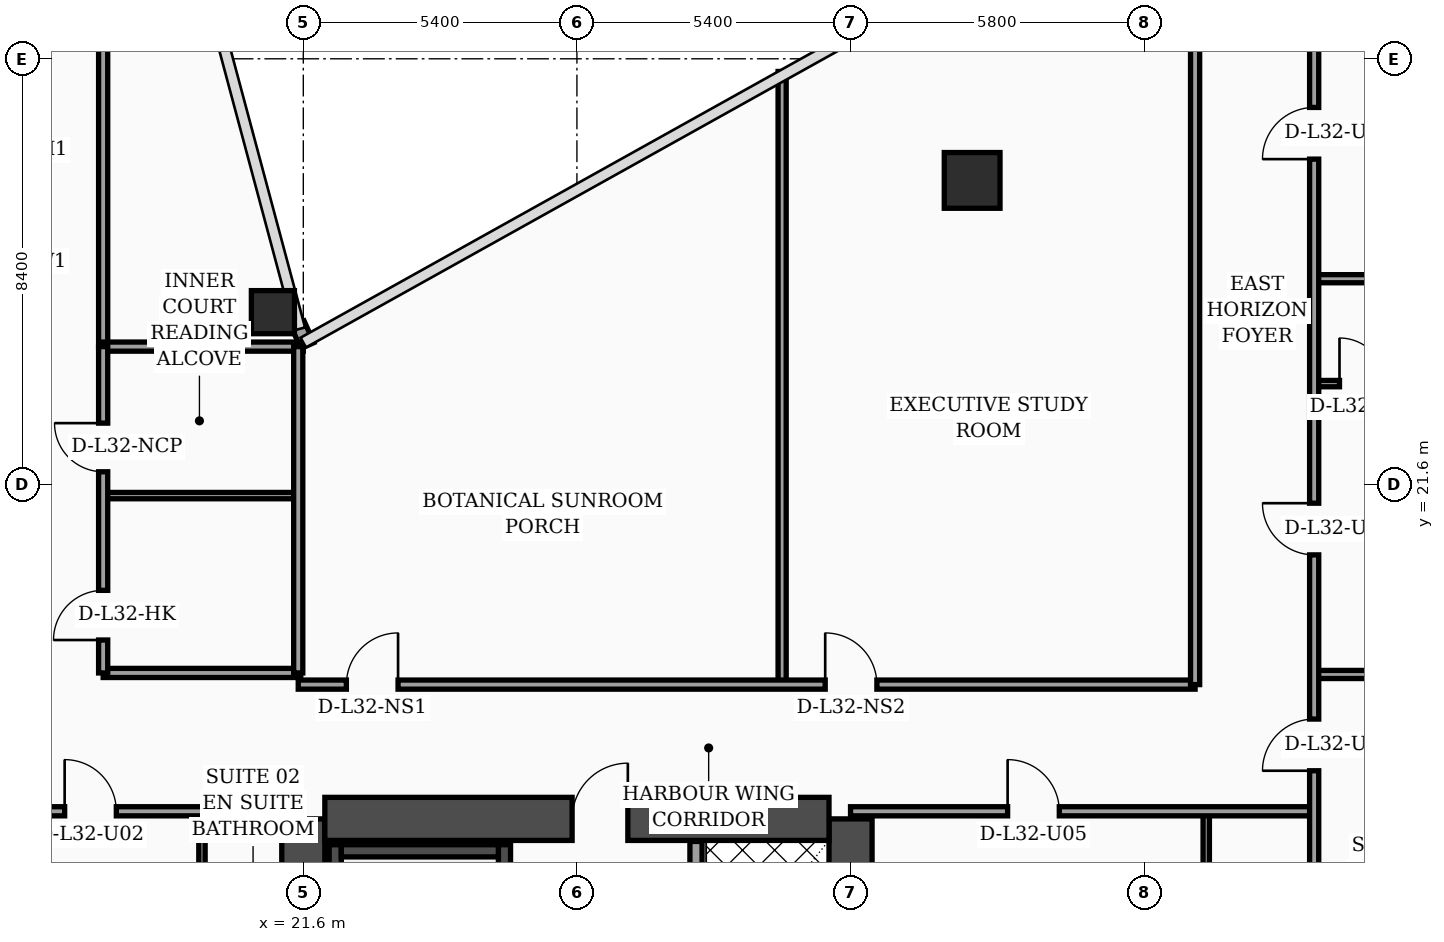
"""IFC4 building model, lengths in metres.
Left out: names, types, materials, properties, quantities, classifications, styles, units other than length and angle.
Written with IfcOpenShell. Run it as: python <this file> out.ifc"""

import sys

from ifc_helpers import new_model, si_unit, direction, frame, frame_2d, origin, origin_2d, place, context, subcontext, project, spatial, rectangle, hollow_rectangle, circle, extrude, element, fill, save


model = new_model("IFC4")
c1 = context("Model", 3, precision=1e-05, world=origin(), true_north=direction((0.0, 1.0)))
c2 = subcontext(c1, "Body", "Model", "MODEL_VIEW")
j1 = project(units=[si_unit("LENGTHUNIT", "METRE"), si_unit("PLANEANGLEUNIT", "RADIAN")], contexts=[c1])
p1 = place(None, origin())
s1 = spatial("IfcSite", under=j1, at=p1, CompositionType="ELEMENT")
p2 = place(p1, origin())
s2 = spatial("IfcBuilding", under=s1, at=p2, CompositionType="ELEMENT")
p3 = place(p2, frame((0.0, 0.0, 131.6)))
s3 = spatial("IfcBuildingStorey", under=s2, at=p3, CompositionType="ELEMENT", Elevation=131.6)
for number, where, z_axis, x_axis in (
    (1, (21.6, 4.6, 0.0), (0.0, 0.0, 1.0), (0.0, 1.0, 0.0)),
    (2, (32.4, 4.6, 0.0), (0.0, 0.0, 1.0), (0.0, 1.0, 0.0)),
):
    element("IfcWall", number, at=place(p3, frame(where, z_axis=z_axis, x_axis=x_axis)), inside=s3, PredefinedType="SHEAR", context=c2, shape_type="SweptSolid", body=[
        extrude(rectangle(XDim=10.4, YDim=0.85, at=frame_2d((5.2, 0.0))), origin(), (0.0, 0.0, 1.0), 3.56),
    ])
p4 = place(p3, frame((22.025, 15.0, 0.0), z_axis=(0.0, 0.0, 1.0), x_axis=(1.0, 0.0, 0.0)))
e3 = element("IfcWall", 3, at=p4, inside=s3, PredefinedType="SHEAR", context=c2, shape_type="SweptSolid", body=[
    extrude(rectangle(XDim=9.95, YDim=0.85, at=frame_2d((4.975, 0.0))), origin(), (0.0, 0.0, 1.0), 3.56),
])
p5 = place(p4, frame((4.88, 0.0, 0.0)))
e4 = element("IfcOpeningElement", 4, at=p5, cuts=e3, PredefinedType="OPENING", context=c2, shape_type="SweptSolid", body=[
    extrude(rectangle(XDim=1.1, YDim=2.2, at=frame_2d((0.55, 1.1))), frame((0.0, 0.435, 0.0), z_axis=(0.0, -1.0, 0.0), x_axis=(1.0, 0.0, 0.0)), (0.0, 0.0, 1.0), 0.87),
])
p6 = place(p3, frame((22.23, 5.025, 0.0), z_axis=(0.0, 0.0, 1.0), x_axis=(0.0, 1.0, 0.0)))
e5 = element("IfcWall", 5, at=p6, inside=s3, PredefinedType="SOLIDWALL", context=c2, shape_type="SweptSolid", body=[
    extrude(rectangle(XDim=9.465, YDim=0.24, at=frame_2d((4.732, 0.0))), origin(), (0.0, 0.0, 1.0), 3.56),
])
p7 = place(p3, frame((25.57, 5.025, 0.0), z_axis=(0.0, 0.0, 1.0), x_axis=(0.0, 1.0, 0.0)))
e6 = element("IfcWall", 6, at=p7, inside=s3, PredefinedType="SOLIDWALL", context=c2, shape_type="SweptSolid", body=[
    extrude(rectangle(XDim=9.465, YDim=0.24, at=frame_2d((4.732, 0.0))), origin(), (0.0, 0.0, 1.0), 3.56),
])
p8 = place(p7, frame((0.35, 0.0, 0.0)))
e7 = element("IfcOpeningElement", 7, at=p8, cuts=e6, PredefinedType="OPENING", context=c2, shape_type="SweptSolid", body=[
    extrude(rectangle(XDim=1.15, YDim=2.2, at=frame_2d((0.575, 1.1))), frame((0.0, 0.13, 0.0), z_axis=(0.0, -1.0, 0.0), x_axis=(1.0, 0.0, 0.0)), (0.0, 0.0, 1.0), 0.26),
])
p9 = place(p3, frame((22.35, 14.37, 0.0), z_axis=(0.0, 0.0, 1.0), x_axis=(1.0, 0.0, 0.0)))
e8 = element("IfcWall", 8, at=p9, inside=s3, PredefinedType="SOLIDWALL", context=c2, shape_type="SweptSolid", body=[
    extrude(rectangle(XDim=3.1, YDim=0.24, at=frame_2d((1.55, 0.0))), origin(), (0.0, 0.0, 1.0), 3.56),
])
p10 = place(p3, frame((21.0, 25.0, 0.0), z_axis=(0.0, 0.0, 1.0), x_axis=(1.0, 0.0, 0.0)))
e9 = element("IfcColumn", 9, at=p10, inside=s3, PredefinedType="COLUMN", context=c2, shape_type="SweptSolid", body=[
    extrude(hollow_rectangle(XDim=0.85, YDim=0.85, WallThickness=0.036, at=origin_2d()), origin(), (0.0, 0.0, 1.0), 3.56),
])
p11 = place(p3, frame((34.8, 27.6, 0.0), z_axis=(0.0, 0.0, 1.0), x_axis=(1.0, 0.0, 0.0)))
e10 = element("IfcColumn", 10, at=p11, inside=s3, PredefinedType="COLUMN", context=c2, shape_type="SweptSolid", body=[
    extrude(circle(Radius=0.55, at=origin_2d()), origin(), (0.0, 0.0, 1.0), 3.56),
])
p12 = place(p3, frame((21.68, 24.34, 0.0), z_axis=(0.0, 0.0, 1.0), x_axis=(-0.40758134973, 0.913168901875, 0.0)))
e11 = element("IfcWall", 11, at=p12, inside=s3, PredefinedType="SOLIDWALL", context=c2, shape_type="SweptSolid", body=[
    extrude(rectangle(XDim=0.471, YDim=0.28, at=frame_2d((0.235, 0.0))), origin(), (0.0, 0.0, 1.0), 3.56),
])
p13 = place(p3, frame((29.35, 5.045, 0.0), z_axis=(0.0, 0.0, 1.0), x_axis=(0.0, 1.0, 0.0)))
e12 = element("IfcWall", 12, at=p13, inside=s3, PredefinedType="SOLIDWALL", context=c2, shape_type="SweptSolid", body=[
    extrude(rectangle(XDim=9.51, YDim=0.24, at=frame_2d((4.755, 0.0))), origin(), (0.0, 0.0, 1.0), 3.56),
])
p14 = place(p13, frame((0.55, 0.0, 0.0)))
e13 = element("IfcOpeningElement", 13, at=p14, cuts=e12, PredefinedType="OPENING", context=c2, shape_type="SweptSolid", body=[
    extrude(rectangle(XDim=1.3, YDim=2.35, at=frame_2d((0.65, 1.175))), frame((0.0, 0.13, 0.0), z_axis=(0.0, -1.0, 0.0), x_axis=(1.0, 0.0, 0.0)), (0.0, 0.0, 1.0), 0.26),
])
p15 = place(p3, frame((19.6, 2.44, 0.0), z_axis=(0.0, 0.0, 1.0), x_axis=(0.0, 1.0, 0.0)))
e14 = element("IfcWall", 14, at=p15, inside=s3, PredefinedType="PARTITIONING", context=c2, shape_type="SweptSolid", body=[
    extrude(rectangle(XDim=12.71, YDim=0.125, at=frame_2d((6.355, 0.0))), origin(), (0.0, 0.0, 1.0), 2.49),
])
p16 = place(p15, frame((4.34, 0.0, 0.0)))
e15 = element("IfcOpeningElement", 15, at=p16, cuts=e14, PredefinedType="OPENING", context=c2, shape_type="SweptSolid", body=[
    extrude(rectangle(XDim=0.96, YDim=2.2, at=frame_2d((0.48, 1.1))), frame((0.0, 0.073, 0.0), z_axis=(0.0, -1.0, 0.0), x_axis=(1.0, 0.0, 0.0)), (0.0, 0.0, 1.0), 0.145),
])
p17 = place(p15, frame((10.18, 0.0, 0.0)))
e16 = element("IfcOpeningElement", 16, at=p17, cuts=e14, PredefinedType="OPENING", context=c2, shape_type="SweptSolid", body=[
    extrude(rectangle(XDim=0.9, YDim=2.15, at=frame_2d((0.45, 1.075))), frame((0.0, 0.073, 0.0), z_axis=(0.0, -1.0, 0.0), x_axis=(1.0, 0.0, 0.0)), (0.0, 0.0, 1.0), 0.145),
])
p18 = place(p3, frame((15.15, 15.15, 0.0), z_axis=(0.0, 0.0, 1.0), x_axis=(1.0, 0.0, 0.0)))
e17 = element("IfcWall", 17, at=p18, inside=s3, PredefinedType="PARTITIONING", context=c2, shape_type="SweptSolid", body=[
    extrude(rectangle(XDim=6.45, YDim=0.18, at=frame_2d((3.225, 0.0))), origin(), (0.0, 0.0, 1.0), 2.49),
])
p19 = place(p18, frame((1.74, 0.0, 0.0)))
e18 = element("IfcOpeningElement", 18, at=p19, cuts=e17, PredefinedType="OPENING", context=c2, shape_type="SweptSolid", body=[
    extrude(rectangle(XDim=1.02, YDim=2.2, at=frame_2d((0.51, 1.1))), frame((0.0, 0.1, 0.0), z_axis=(0.0, -1.0, 0.0), x_axis=(1.0, 0.0, 0.0)), (0.0, 0.0, 1.0), 0.2),
])
p20 = place(p3, frame((17.65, 24.3, 0.0), z_axis=(0.0, 0.0, 1.0), x_axis=(0.0, 1.0, 0.0)))
e19 = element("IfcWall", 19, at=p20, inside=s3, PredefinedType="PARTITIONING", context=c2, shape_type="SweptSolid", body=[
    extrude(rectangle(XDim=17.65, YDim=0.18, at=frame_2d((8.825, 0.0))), origin(), (0.0, 0.0, 1.0), 2.84),
])
p21 = place(p3, frame((17.65, 17.88, 0.0), z_axis=(0.0, 0.0, 1.0), x_axis=(1.0, 0.0, 0.0)))
e20 = element("IfcWall", 20, at=p21, inside=s3, PredefinedType="PARTITIONING", context=c2, shape_type="SweptSolid", body=[
    extrude(rectangle(XDim=3.9, YDim=0.18, at=frame_2d((1.95, 0.0))), origin(), (0.0, 0.0, 1.0), 3.56),
])
p22 = place(p3, frame((17.65, 21.38, 0.0), z_axis=(0.0, 0.0, 1.0), x_axis=(1.0, 0.0, 0.0)))
e21 = element("IfcWall", 21, at=p22, inside=s3, PredefinedType="PARTITIONING", context=c2, shape_type="SweptSolid", body=[
    extrude(rectangle(XDim=3.9, YDim=0.125, at=frame_2d((1.95, 0.0))), origin(), (0.0, 0.0, 1.0), 3.09),
])
p23 = place(p3, frame((17.65, 24.32, 0.0), z_axis=(0.0, 0.0, 1.0), x_axis=(1.0, 0.0, 0.0)))
e22 = element("IfcWall", 22, at=p23, inside=s3, PredefinedType="PARTITIONING", context=c2, shape_type="SweptSolid", body=[
    extrude(rectangle(XDim=3.95, YDim=0.18, at=frame_2d((1.975, 0.0))), origin(), (0.0, 0.0, 1.0), 3.56),
])
p24 = place(p3, frame((21.5, 17.88, 0.0), z_axis=(0.0, 0.0, 1.0), x_axis=(0.0, 1.0, 0.0)))
e23 = element("IfcWall", 23, at=p24, inside=s3, PredefinedType="PARTITIONING", context=c2, shape_type="SweptSolid", body=[
    extrude(rectangle(XDim=6.44, YDim=0.18, at=frame_2d((3.22, 0.0))), origin(), (0.0, 0.0, 1.0), 3.09),
])
p25 = place(p3, frame((17.65, 17.88, 0.0), z_axis=(0.0, 0.0, 1.0), x_axis=(0.0, 1.0, 0.0)))
e24 = element("IfcWall", 24, at=p25, inside=s3, PredefinedType="PARTITIONING", context=c2, shape_type="SweptSolid", body=[
    extrude(rectangle(XDim=6.44, YDim=0.18, at=frame_2d((3.22, 0.0))), origin(), (0.0, 0.0, 1.0), 3.09),
])
p26 = place(p25, frame((0.65, 0.0, 0.0)))
e25 = element("IfcOpeningElement", 25, at=p26, cuts=e24, PredefinedType="OPENING", context=c2, shape_type="SweptSolid", body=[
    extrude(rectangle(XDim=0.98, YDim=2.15, at=frame_2d((0.49, 1.075))), frame((0.0, 0.1, 0.0), z_axis=(0.0, -1.0, 0.0), x_axis=(1.0, 0.0, 0.0)), (0.0, 0.0, 1.0), 0.2),
])
p27 = place(p25, frame((3.97, 0.0, 0.0)))
e26 = element("IfcOpeningElement", 26, at=p27, cuts=e24, PredefinedType="OPENING", context=c2, shape_type="SweptSolid", body=[
    extrude(rectangle(XDim=0.96, YDim=2.2, at=frame_2d((0.48, 1.1))), frame((0.0, 0.1, 0.0), z_axis=(0.0, -1.0, 0.0), x_axis=(1.0, 0.0, 0.0)), (0.0, 0.0, 1.0), 0.2),
])
p28 = place(p3, frame((39.42, 2.44, 0.0), z_axis=(0.0, 0.0, 1.0), x_axis=(0.0, 1.0, 0.0)))
e27 = element("IfcWall", 27, at=p28, inside=s3, PredefinedType="PARTITIONING", context=c2, shape_type="SweptSolid", body=[
    extrude(rectangle(XDim=12.71, YDim=0.125, at=frame_2d((6.355, 0.0))), origin(), (0.0, 0.0, 1.0), 2.84),
])
p29 = place(p28, frame((4.35, 0.0, 0.0)))
e28 = element("IfcOpeningElement", 28, at=p29, cuts=e27, PredefinedType="OPENING", context=c2, shape_type="SweptSolid", body=[
    extrude(rectangle(XDim=0.96, YDim=2.2, at=frame_2d((0.48, 1.1))), frame((0.0, 0.073, 0.0), z_axis=(0.0, -1.0, 0.0), x_axis=(1.0, 0.0, 0.0)), (0.0, 0.0, 1.0), 0.145),
])
p30 = place(p28, frame((10.21, 0.0, 0.0)))
e29 = element("IfcOpeningElement", 29, at=p30, cuts=e27, PredefinedType="OPENING", context=c2, shape_type="SweptSolid", body=[
    extrude(rectangle(XDim=0.9, YDim=2.15, at=frame_2d((0.45, 1.075))), frame((0.0, 0.073, 0.0), z_axis=(0.0, -1.0, 0.0), x_axis=(1.0, 0.0, 0.0)), (0.0, 0.0, 1.0), 0.145),
])
p31 = place(p3, frame((32.4, 15.15, 0.0), z_axis=(0.0, 0.0, 1.0), x_axis=(1.0, 0.0, 0.0)))
e30 = element("IfcWall", 30, at=p31, inside=s3, PredefinedType="PARTITIONING", context=c2, shape_type="SweptSolid", body=[
    extrude(rectangle(XDim=9.15, YDim=0.18, at=frame_2d((4.575, 0.0))), origin(), (0.0, 0.0, 1.0), 2.84),
])
p32 = place(p31, frame((3.1, 0.0, 0.0)))
e31 = element("IfcOpeningElement", 31, at=p32, cuts=e30, PredefinedType="OPENING", context=c2, shape_type="SweptSolid", body=[
    extrude(rectangle(XDim=1.02, YDim=2.2, at=frame_2d((0.51, 1.1))), frame((0.0, 0.1, 0.0), z_axis=(0.0, -1.0, 0.0), x_axis=(1.0, 0.0, 0.0)), (0.0, 0.0, 1.0), 0.2),
])
p33 = place(p3, frame((31.05, 17.65, 0.0), z_axis=(0.0, 0.0, 1.0), x_axis=(0.0, 1.0, 0.0)))
e32 = element("IfcWall", 32, at=p33, inside=s3, PredefinedType="PARTITIONING", context=c2, shape_type="SweptSolid", body=[
    extrude(rectangle(XDim=12.1, YDim=0.16, at=frame_2d((6.05, 0.0))), origin(), (0.0, 0.0, 1.0), 2.84),
])
p34 = place(p3, frame((21.5, 17.65, 0.0), z_axis=(0.0, 0.0, 1.0), x_axis=(1.0, 0.0, 0.0)))
e33 = element("IfcWall", 33, at=p34, inside=s3, PredefinedType="PARTITIONING", context=c2, shape_type="SweptSolid", body=[
    extrude(rectangle(XDim=17.7, YDim=0.18, at=frame_2d((8.85, 0.0))), origin(), (0.0, 0.0, 1.0), 2.84),
])
p35 = place(p34, frame((0.95, 0.0, 0.0)))
e34 = element("IfcOpeningElement", 34, at=p35, cuts=e33, PredefinedType="OPENING", context=c2, shape_type="SweptSolid", body=[
    extrude(rectangle(XDim=1.02, YDim=2.2, at=frame_2d((0.51, 1.1))), frame((0.0, 0.1, 0.0), z_axis=(0.0, -1.0, 0.0), x_axis=(1.0, 0.0, 0.0)), (0.0, 0.0, 1.0), 0.2),
])
p36 = place(p34, frame((10.4, 0.0, 0.0)))
e35 = element("IfcOpeningElement", 35, at=p36, cuts=e33, PredefinedType="OPENING", context=c2, shape_type="SweptSolid", body=[
    extrude(rectangle(XDim=1.02, YDim=2.2, at=frame_2d((0.51, 1.1))), frame((0.0, 0.1, 0.0), z_axis=(0.0, -1.0, 0.0), x_axis=(1.0, 0.0, 0.0)), (0.0, 0.0, 1.0), 0.2),
])
p37 = place(p3, frame((39.2, 17.65, 0.0), z_axis=(0.0, 0.0, 1.0), x_axis=(0.0, 1.0, 0.0)))
e36 = element("IfcWall", 36, at=p37, inside=s3, PredefinedType="PARTITIONING", context=c2, shape_type="SweptSolid", body=[
    extrude(rectangle(XDim=16.64, YDim=0.18, at=frame_2d((8.32, 0.0))), origin(), (0.0, 0.0, 1.0), 2.84),
])
p38 = place(p3, frame((41.55, 23.59, 0.0), z_axis=(0.0, 0.0, 1.0), x_axis=(1.0, 0.0, 0.0)))
e37 = element("IfcWall", 37, at=p38, inside=s3, PredefinedType="PARTITIONING", context=c2, shape_type="SweptSolid", body=[
    extrude(rectangle(XDim=11.92, YDim=0.125, at=frame_2d((5.96, 0.0))), origin(), (0.0, 0.0, 1.0), 2.84),
])
p39 = place(p38, frame((0.5, 0.0, 0.0)))
e38 = element("IfcOpeningElement", 38, at=p39, cuts=e37, PredefinedType="OPENING", context=c2, shape_type="SweptSolid", body=[
    extrude(rectangle(XDim=0.9, YDim=2.15, at=frame_2d((0.45, 1.075))), frame((0.0, 0.073, 0.0), z_axis=(0.0, -1.0, 0.0), x_axis=(1.0, 0.0, 0.0)), (0.0, 0.0, 1.0), 0.145),
])
p40 = place(p38, frame((3.6, 0.0, 0.0)))
e39 = element("IfcOpeningElement", 39, at=p40, cuts=e37, PredefinedType="OPENING", context=c2, shape_type="SweptSolid", body=[
    extrude(rectangle(XDim=0.96, YDim=2.2, at=frame_2d((0.48, 1.1))), frame((0.0, 0.073, 0.0), z_axis=(0.0, -1.0, 0.0), x_axis=(1.0, 0.0, 0.0)), (0.0, 0.0, 1.0), 0.145),
])
p41 = place(p3, frame((41.55, 25.66, 0.0), z_axis=(0.0, 0.0, 1.0), x_axis=(1.0, 0.0, 0.0)))
e40 = element("IfcWall", 40, at=p41, inside=s3, PredefinedType="PARTITIONING", context=c2, shape_type="SweptSolid", body=[
    extrude(rectangle(XDim=11.27, YDim=0.16, at=frame_2d((5.635, 0.0))), origin(), (0.0, 0.0, 1.0), 2.84),
])
p42 = place(p3, frame((41.55, 17.85, 0.0), z_axis=(0.0, 0.0, 1.0), x_axis=(1.0, 0.0, 0.0)))
e41 = element("IfcWall", 41, at=p42, inside=s3, PredefinedType="PARTITIONING", context=c2, shape_type="SweptSolid", body=[
    extrude(rectangle(XDim=13.73, YDim=0.16, at=frame_2d((6.865, 0.0))), origin(), (0.0, 0.0, 1.0), 2.84),
])
p43 = place(p3, frame((41.55, 2.44, 0.0), z_axis=(0.0, 0.0, 1.0), x_axis=(0.0, 1.0, 0.0)))
e42 = element("IfcWall", 42, at=p43, inside=s3, PredefinedType="PARTITIONING", context=c2, shape_type="SweptSolid", body=[
    extrude(rectangle(XDim=31.04, YDim=0.18, at=frame_2d((15.52, 0.0))), origin(), (0.0, 0.0, 1.0), 2.84),
])
p44 = place(p43, frame((13.51, 0.0, 0.0)))
e43 = element("IfcOpeningElement", 43, at=p44, cuts=e42, PredefinedType="OPENING", context=c2, shape_type="SweptSolid", body=[
    extrude(rectangle(XDim=1.02, YDim=2.2, at=frame_2d((0.51, 1.1))), frame((0.0, 0.1, 0.0), z_axis=(0.0, -1.0, 0.0), x_axis=(1.0, 0.0, 0.0)), (0.0, 0.0, 1.0), 0.2),
])
p45 = place(p43, frame((17.77, 0.0, 0.0)))
e44 = element("IfcOpeningElement", 44, at=p45, cuts=e42, PredefinedType="OPENING", context=c2, shape_type="SweptSolid", body=[
    extrude(rectangle(XDim=1.02, YDim=2.2, at=frame_2d((0.51, 1.1))), frame((0.0, 0.1, 0.0), z_axis=(0.0, -1.0, 0.0), x_axis=(1.0, 0.0, 0.0)), (0.0, 0.0, 1.0), 0.2),
])
p46 = place(p43, frame((25.58, 0.0, 0.0)))
e45 = element("IfcOpeningElement", 45, at=p46, cuts=e42, PredefinedType="OPENING", context=c2, shape_type="SweptSolid", body=[
    extrude(rectangle(XDim=1.02, YDim=2.2, at=frame_2d((0.51, 1.1))), frame((0.0, 0.1, 0.0), z_axis=(0.0, -1.0, 0.0), x_axis=(1.0, 0.0, 0.0)), (0.0, 0.0, 1.0), 0.2),
])
p47 = place(p19, origin())
e46 = element("IfcDoor", 46, at=p47, inside=s3, OperationType="SINGLE_SWING_LEFT", PredefinedType="DOOR", context=c2, shape_type="SweptSolid", body=[
    extrude(rectangle(XDim=1.02, YDim=2.2, at=frame_2d((0.51, 1.1))), frame((0.0, 0.025, 0.0), z_axis=(0.0, -1.0, 0.0), x_axis=(1.0, 0.0, 0.0)), (0.0, 0.0, 1.0), 0.05),
])
fill(e18, e46)
p48 = place(p26, origin())
e47 = element("IfcDoor", 47, at=p48, inside=s3, OperationType="SINGLE_SWING_LEFT", PredefinedType="DOOR", context=c2, shape_type="SweptSolid", body=[
    extrude(rectangle(XDim=0.98, YDim=2.15, at=frame_2d((0.49, 1.075))), frame((0.0, 0.025, 0.0), z_axis=(0.0, -1.0, 0.0), x_axis=(1.0, 0.0, 0.0)), (0.0, 0.0, 1.0), 0.05),
])
fill(e25, e47)
p49 = place(p27, origin())
e48 = element("IfcDoor", 48, at=p49, inside=s3, OperationType="SINGLE_SWING_RIGHT", PredefinedType="DOOR", context=c2, shape_type="SweptSolid", body=[
    extrude(rectangle(XDim=0.96, YDim=2.2, at=frame_2d((0.48, 1.1))), frame((0.0, 0.025, 0.0), z_axis=(0.0, -1.0, 0.0), x_axis=(1.0, 0.0, 0.0)), (0.0, 0.0, 1.0), 0.05),
])
fill(e26, e48)
p50 = place(p32, origin())
e49 = element("IfcDoor", 49, at=p50, inside=s3, OperationType="SINGLE_SWING_LEFT", PredefinedType="DOOR", context=c2, shape_type="SweptSolid", body=[
    extrude(rectangle(XDim=1.02, YDim=2.2, at=frame_2d((0.51, 1.1))), frame((0.0, 0.025, 0.0), z_axis=(0.0, -1.0, 0.0), x_axis=(1.0, 0.0, 0.0)), (0.0, 0.0, 1.0), 0.05),
])
fill(e31, e49)
p51 = place(p35, origin())
e50 = element("IfcDoor", 50, at=p51, inside=s3, OperationType="SINGLE_SWING_RIGHT", PredefinedType="DOOR", context=c2, shape_type="SweptSolid", body=[
    extrude(rectangle(XDim=1.02, YDim=2.2, at=frame_2d((0.51, 1.1))), frame((0.0, 0.025, 0.0), z_axis=(0.0, -1.0, 0.0), x_axis=(1.0, 0.0, 0.0)), (0.0, 0.0, 1.0), 0.05),
])
fill(e34, e50)
p52 = place(p36, origin())
e51 = element("IfcDoor", 51, at=p52, inside=s3, OperationType="SINGLE_SWING_LEFT", PredefinedType="DOOR", context=c2, shape_type="SweptSolid", body=[
    extrude(rectangle(XDim=1.02, YDim=2.2, at=frame_2d((0.51, 1.1))), frame((0.0, 0.025, 0.0), z_axis=(0.0, -1.0, 0.0), x_axis=(1.0, 0.0, 0.0)), (0.0, 0.0, 1.0), 0.05),
])
fill(e35, e51)
p53 = place(p39, origin())
e52 = element("IfcDoor", 52, at=p53, inside=s3, OperationType="SINGLE_SWING_LEFT", PredefinedType="DOOR", context=c2, shape_type="SweptSolid", body=[
    extrude(rectangle(XDim=0.9, YDim=2.15, at=frame_2d((0.45, 1.075))), frame((0.0, 0.025, 0.0), z_axis=(0.0, -1.0, 0.0), x_axis=(1.0, 0.0, 0.0)), (0.0, 0.0, 1.0), 0.05),
])
fill(e38, e52)
p54 = place(p44, origin())
e53 = element("IfcDoor", 53, at=p54, inside=s3, OperationType="SINGLE_SWING_LEFT", PredefinedType="DOOR", context=c2, shape_type="SweptSolid", body=[
    extrude(rectangle(XDim=1.02, YDim=2.2, at=frame_2d((0.51, 1.1))), frame((0.0, 0.025, 0.0), z_axis=(0.0, -1.0, 0.0), x_axis=(1.0, 0.0, 0.0)), (0.0, 0.0, 1.0), 0.05),
])
fill(e43, e53)
p55 = place(p45, origin())
e54 = element("IfcDoor", 54, at=p55, inside=s3, OperationType="SINGLE_SWING_RIGHT", PredefinedType="DOOR", context=c2, shape_type="SweptSolid", body=[
    extrude(rectangle(XDim=1.02, YDim=2.2, at=frame_2d((0.51, 1.1))), frame((0.0, 0.025, 0.0), z_axis=(0.0, -1.0, 0.0), x_axis=(1.0, 0.0, 0.0)), (0.0, 0.0, 1.0), 0.05),
])
fill(e44, e54)
p56 = place(p46, origin())
e55 = element("IfcDoor", 55, at=p56, inside=s3, OperationType="SINGLE_SWING_LEFT", PredefinedType="DOOR", context=c2, shape_type="SweptSolid", body=[
    extrude(rectangle(XDim=1.02, YDim=2.2, at=frame_2d((0.51, 1.1))), frame((0.0, 0.025, 0.0), z_axis=(0.0, -1.0, 0.0), x_axis=(1.0, 0.0, 0.0)), (0.0, 0.0, 1.0), 0.05),
])
fill(e45, e55)
p57 = place(p5, origin())
e56 = element("IfcDoor", 56, at=p57, inside=s3, OperationType="SINGLE_SWING_RIGHT", PredefinedType="DOOR", context=c2, shape_type="SweptSolid", body=[
    extrude(rectangle(XDim=1.1, YDim=2.2, at=frame_2d((0.55, 1.1))), frame((0.0, 0.025, 0.0), z_axis=(0.0, -1.0, 0.0), x_axis=(1.0, 0.0, 0.0)), (0.0, 0.0, 1.0), 0.05),
])
fill(e4, e56)
save(model, sys.argv[1])
